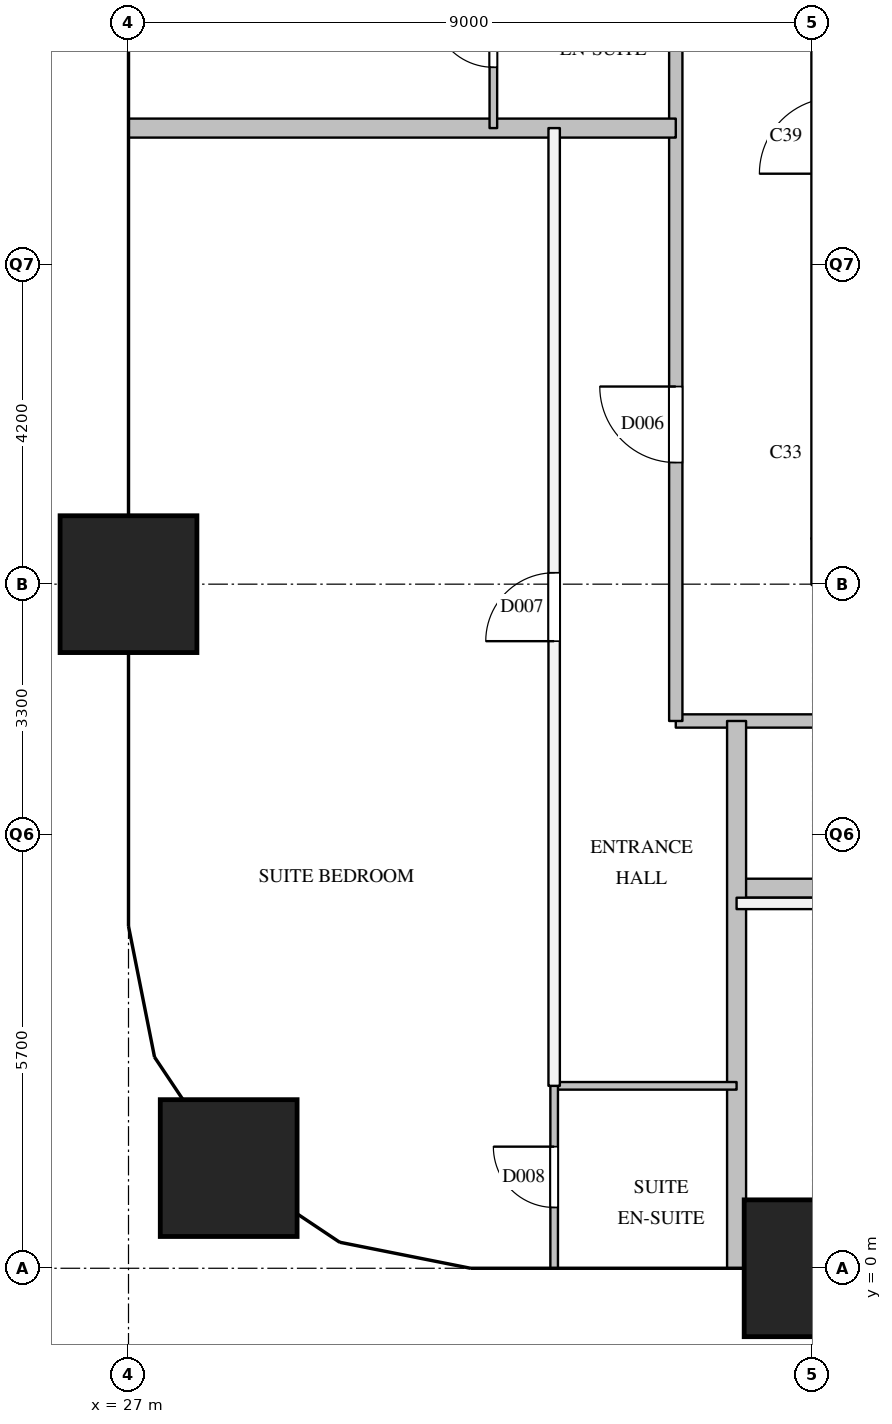
"""IFC4 building model, lengths in metres.
Left out: names, types, materials, properties, quantities, classifications, styles, units other than length and angle.
Written with IfcOpenShell. Run it as: python <this file> out.ifc"""

import sys

from ifc_helpers import new_model, si_unit, direction, frame, frame_2d, origin, origin_2d, place, context, subcontext, project, spatial, rectangle, extrude, element, fill, save


model = new_model("IFC4")
c1 = context("Model", 3, precision=1e-05, world=origin(), true_north=direction((0.0, 1.0)))
c2 = subcontext(c1, "Body", "Model", "MODEL_VIEW")
j1 = project(units=[si_unit("LENGTHUNIT", "METRE"), si_unit("PLANEANGLEUNIT", "RADIAN")], contexts=[c1])
p1 = place(None, origin())
s1 = spatial("IfcSite", under=j1, at=p1, CompositionType="ELEMENT")
p2 = place(p1, origin())
s2 = spatial("IfcBuilding", under=s1, at=p2, CompositionType="ELEMENT")
p3 = place(p2, frame((0.0, 0.0, 119.6)))
s3 = spatial("IfcBuildingStorey", under=s2, at=p3, CompositionType="ELEMENT", Elevation=119.6)
for number, where, z_axis, x_axis in (
    (1, (28.318, 1.318, 0.0), (0.0, 0.0, 1.0), (1.0, 0.0, 0.0)),
    (2, (27.0, 9.0, 0.0), (0.0, 0.0, 1.0), (1.0, 0.0, 0.0)),
    (3, (36.0, 0.0, 0.0), (0.0, 0.0, 1.0), (1.0, 0.0, 0.0)),
):
    element("IfcColumn", number, at=place(p3, frame(where, z_axis=z_axis, x_axis=x_axis)), inside=s3, PredefinedType="COLUMN", context=c2, shape_type="SweptSolid", body=[
        extrude(rectangle(XDim=1.8, YDim=1.8, at=origin_2d()), origin(), (0.0, 0.0, 1.0), 3.8),
    ])
p4 = place(p3, frame((34.2, 7.2, 0.0), z_axis=(0.0, 0.0, 1.0), x_axis=(1.0, 0.0, 0.0)))
e4 = element("IfcWall", 4, at=p4, inside=s3, PredefinedType="PARTITIONING", context=c2, shape_type="SweptSolid", body=[
    extrude(rectangle(XDim=12.6, YDim=0.175, at=frame_2d((6.3, 0.0))), origin(), (0.0, 0.0, 1.0), 3.3),
])
p5 = place(p4, frame((6.6, 0.0, 0.0)))
e5 = element("IfcOpeningElement", 5, at=p5, cuts=e4, PredefinedType="OPENING", context=c2, shape_type="SweptSolid", body=[
    extrude(rectangle(XDim=1.0, YDim=2.1, at=frame_2d((0.5, 1.05))), frame((0.0, 0.097, 0.0), z_axis=(0.0, -1.0, 0.0), x_axis=(1.0, 0.0, 0.0)), (0.0, 0.0, 1.0), 0.195),
])
p6 = place(p4, frame((2.8, 0.0, 0.0)))
e6 = element("IfcOpeningElement", 6, at=p6, cuts=e4, PredefinedType="OPENING", context=c2, shape_type="SweptSolid", body=[
    extrude(rectangle(XDim=1.0, YDim=2.1, at=frame_2d((0.5, 1.05))), frame((0.0, 0.097, 0.0), z_axis=(0.0, -1.0, 0.0), x_axis=(1.0, 0.0, 0.0)), (0.0, 0.0, 1.0), 0.195),
])
p7 = place(p3, frame((34.2, 7.2, 0.0), z_axis=(0.0, 0.0, 1.0), x_axis=(0.0, 1.0, 0.0)))
e7 = element("IfcWall", 7, at=p7, inside=s3, PredefinedType="PARTITIONING", context=c2, shape_type="SweptSolid", body=[
    extrude(rectangle(XDim=16.49, YDim=0.175, at=frame_2d((8.245, 0.0))), origin(), (0.0, 0.0, 1.0), 3.3),
])
p8 = place(p7, frame((3.4, 0.0, 0.0)))
e8 = element("IfcOpeningElement", 8, at=p8, cuts=e7, PredefinedType="OPENING", context=c2, shape_type="SweptSolid", body=[
    extrude(rectangle(XDim=1.0, YDim=2.1, at=frame_2d((0.5, 1.05))), frame((0.0, 0.097, 0.0), z_axis=(0.0, -1.0, 0.0), x_axis=(1.0, 0.0, 0.0)), (0.0, 0.0, 1.0), 0.195),
])
p9 = place(p7, frame((11.0, 0.0, 0.0)))
e9 = element("IfcOpeningElement", 9, at=p9, cuts=e7, PredefinedType="OPENING", context=c2, shape_type="SweptSolid", body=[
    extrude(rectangle(XDim=1.0, YDim=2.1, at=frame_2d((0.5, 1.05))), frame((0.0, 0.097, 0.0), z_axis=(0.0, -1.0, 0.0), x_axis=(1.0, 0.0, 0.0)), (0.0, 0.0, 1.0), 0.195),
])
p10 = place(p7, frame((14.195, 0.0, 0.0)))
e10 = element("IfcOpeningElement", 10, at=p10, cuts=e7, PredefinedType="OPENING", context=c2, shape_type="SweptSolid", body=[
    extrude(rectangle(XDim=0.9, YDim=2.1, at=frame_2d((0.45, 1.05))), frame((0.0, 0.097, 0.0), z_axis=(0.0, -1.0, 0.0), x_axis=(1.0, 0.0, 0.0)), (0.0, 0.0, 1.0), 0.195),
])
p11 = place(p3, frame((35.0, 4.8, 0.0), z_axis=(0.0, 0.0, 1.0), x_axis=(1.0, 0.0, 0.0)))
e11 = element("IfcWall", 11, at=p11, inside=s3, PredefinedType="PARTITIONING", context=c2, shape_type="SweptSolid", body=[
    extrude(rectangle(XDim=7.6, YDim=0.15, at=frame_2d((3.8, 0.0))), origin(), (0.0, 0.0, 1.0), 3.3),
])
p12 = place(p11, frame((5.52, 0.0, 0.0)))
e12 = element("IfcOpeningElement", 12, at=p12, cuts=e11, PredefinedType="OPENING", context=c2, shape_type="SweptSolid", body=[
    extrude(rectangle(XDim=0.9, YDim=2.1, at=frame_2d((0.45, 1.05))), frame((0.0, 0.085, 0.0), z_axis=(0.0, -1.0, 0.0), x_axis=(1.0, 0.0, 0.0)), (0.0, 0.0, 1.0), 0.17),
])
p13 = place(p3, frame((32.6, 2.4, 0.0), z_axis=(0.0, 0.0, 1.0), x_axis=(0.0, 1.0, 0.0)))
e13 = element("IfcWall", 13, at=p13, inside=s3, PredefinedType="PARTITIONING", context=c2, shape_type="SweptSolid", body=[
    extrude(rectangle(XDim=12.6, YDim=0.15, at=frame_2d((6.3, 0.0))), origin(), (0.0, 0.0, 1.0), 3.3),
])
p14 = place(p13, frame((5.85, 0.0, 0.0)))
e14 = element("IfcOpeningElement", 14, at=p14, cuts=e13, PredefinedType="OPENING", context=c2, shape_type="SweptSolid", body=[
    extrude(rectangle(XDim=0.9, YDim=2.1, at=frame_2d((0.45, 1.05))), frame((0.0, 0.085, 0.0), z_axis=(0.0, -1.0, 0.0), x_axis=(1.0, 0.0, 0.0)), (0.0, 0.0, 1.0), 0.17),
])
p15 = place(p3, frame((35.0, 5.0, 0.0), z_axis=(0.0, 0.0, 1.0), x_axis=(1.0, 0.0, 0.0)))
e15 = element("IfcWall", 15, at=p15, inside=s3, PredefinedType="PARTITIONING", context=c2, shape_type="SweptSolid", body=[
    extrude(rectangle(XDim=5.125, YDim=0.25, at=frame_2d((2.562, 0.0))), origin(), (0.0, 0.0, 1.0), 3.3),
])
for number, where, z_axis, x_axis in (
    (16, (27.0, 15.0, 0.0), (0.0, 0.0, 1.0), (1.0, 0.0, 0.0)),
    (17, (35.0, 0.0, 0.0), (0.0, 0.0, 1.0), (0.0, 1.0, 0.0)),
):
    element("IfcWall", number, at=place(p3, frame(where, z_axis=z_axis, x_axis=x_axis)), inside=s3, PredefinedType="PARTITIONING", context=c2, shape_type="SweptSolid", body=[
        extrude(rectangle(XDim=7.2, YDim=0.25, at=frame_2d((3.6, 0.0))), origin(), (0.0, 0.0, 1.0), 2.3),
    ])
p16 = place(p3, frame((32.6, 2.4, 0.0), z_axis=(0.0, 0.0, 1.0), x_axis=(1.0, 0.0, 0.0)))
e18 = element("IfcWall", 18, at=p16, inside=s3, PredefinedType="PARTITIONING", context=c2, shape_type="SweptSolid", body=[
    extrude(rectangle(XDim=2.4, YDim=0.1, at=frame_2d((1.2, 0.0))), origin(), (0.0, 0.0, 1.0), 3.3),
])
p17 = place(p3, frame((31.8, 15.0, 0.0), z_axis=(0.0, 0.0, 1.0), x_axis=(0.0, 1.0, 0.0)))
e19 = element("IfcWall", 19, at=p17, inside=s3, PredefinedType="PARTITIONING", context=c2, shape_type="SweptSolid", body=[
    extrude(rectangle(XDim=2.4, YDim=0.1, at=frame_2d((1.2, 0.0))), origin(), (0.0, 0.0, 1.0), 3.3),
])
p18 = place(p17, frame((0.8, 0.0, 0.0)))
e20 = element("IfcOpeningElement", 20, at=p18, cuts=e19, PredefinedType="OPENING", context=c2, shape_type="SweptSolid", body=[
    extrude(rectangle(XDim=0.8, YDim=2.1, at=frame_2d((0.4, 1.05))), frame((0.0, 0.06, 0.0), z_axis=(0.0, -1.0, 0.0), x_axis=(1.0, 0.0, 0.0)), (0.0, 0.0, 1.0), 0.12),
])
p19 = place(p3, frame((32.6, 0.0, 0.0), z_axis=(0.0, 0.0, 1.0), x_axis=(0.0, 1.0, 0.0)))
e21 = element("IfcWall", 21, at=p19, inside=s3, PredefinedType="PARTITIONING", context=c2, shape_type="SweptSolid", body=[
    extrude(rectangle(XDim=2.4, YDim=0.1, at=frame_2d((1.2, 0.0))), origin(), (0.0, 0.0, 1.0), 2.3),
])
p20 = place(p19, frame((0.8, 0.0, 0.0)))
e22 = element("IfcOpeningElement", 22, at=p20, cuts=e21, PredefinedType="OPENING", context=c2, shape_type="SweptSolid", body=[
    extrude(rectangle(XDim=0.8, YDim=2.1, at=frame_2d((0.4, 1.05))), frame((0.0, 0.06, 0.0), z_axis=(0.0, -1.0, 0.0), x_axis=(1.0, 0.0, 0.0)), (0.0, 0.0, 1.0), 0.12),
])
p21 = place(p8, origin())
e23 = element("IfcDoor", 23, at=p21, inside=s3, OperationType="SINGLE_SWING_RIGHT", PredefinedType="DOOR", context=c2, shape_type="SweptSolid", body=[
    extrude(rectangle(XDim=1.0, YDim=2.1, at=frame_2d((0.5, 1.05))), frame((0.0, 0.025, 0.0), z_axis=(0.0, -1.0, 0.0), x_axis=(1.0, 0.0, 0.0)), (0.0, 0.0, 1.0), 0.05),
])
fill(e8, e23)
p22 = place(p14, origin())
e24 = element("IfcDoor", 24, at=p22, inside=s3, OperationType="SINGLE_SWING_LEFT", PredefinedType="DOOR", context=c2, shape_type="SweptSolid", body=[
    extrude(rectangle(XDim=0.9, YDim=2.1, at=frame_2d((0.45, 1.05))), frame((0.0, 0.025, 0.0), z_axis=(0.0, -1.0, 0.0), x_axis=(1.0, 0.0, 0.0)), (0.0, 0.0, 1.0), 0.05),
])
fill(e14, e24)
p23 = place(p20, origin())
e25 = element("IfcDoor", 25, at=p23, inside=s3, OperationType="SINGLE_SWING_RIGHT", PredefinedType="DOOR", context=c2, shape_type="SweptSolid", body=[
    extrude(rectangle(XDim=0.8, YDim=2.1, at=frame_2d((0.4, 1.05))), frame((0.0, 0.025, 0.0), z_axis=(0.0, -1.0, 0.0), x_axis=(1.0, 0.0, 0.0)), (0.0, 0.0, 1.0), 0.05),
])
fill(e22, e25)
p24 = place(p18, origin())
e26 = element("IfcDoor", 26, at=p24, inside=s3, OperationType="SINGLE_SWING_RIGHT", PredefinedType="DOOR", context=c2, shape_type="SweptSolid", body=[
    extrude(rectangle(XDim=0.8, YDim=2.1, at=frame_2d((0.4, 1.05))), frame((0.0, 0.025, 0.0), z_axis=(0.0, -1.0, 0.0), x_axis=(1.0, 0.0, 0.0)), (0.0, 0.0, 1.0), 0.05),
])
fill(e20, e26)
save(model, sys.argv[1])
